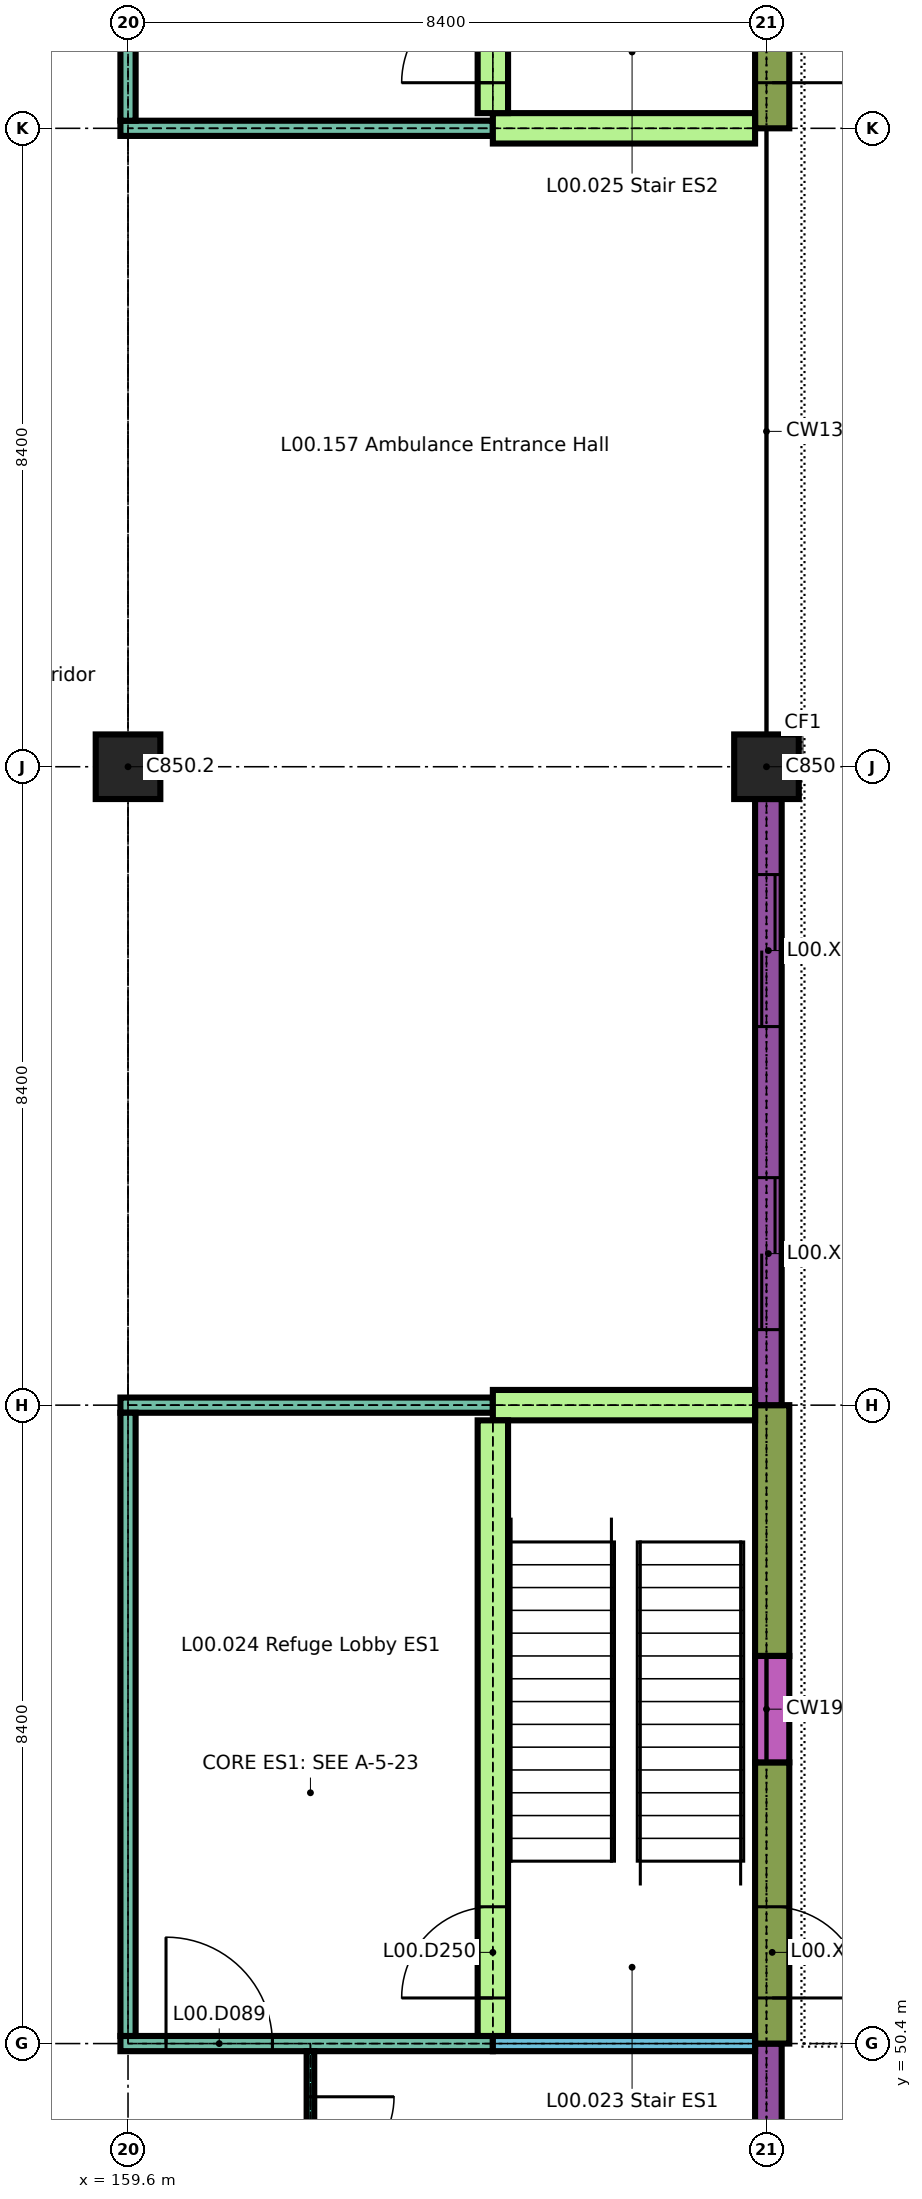
"""IFC4 building model, lengths in metres.
Left out: names, types, materials, properties, quantities, classifications, styles, units other than length and angle.
Written with IfcOpenShell. Run it as: python <this file> out.ifc"""

import sys

from ifc_helpers import new_model, si_unit, direction, frame, frame_2d, origin, origin_2d, place, context, subcontext, project, spatial, rectangle, extrude, element, fill, save


model = new_model("IFC4")
c1 = context("Model", 3, precision=1e-05, world=origin(), true_north=direction((0.0, 1.0)))
c2 = subcontext(c1, "Body", "Model", "MODEL_VIEW")
j1 = project(units=[si_unit("LENGTHUNIT", "METRE"), si_unit("PLANEANGLEUNIT", "RADIAN")], contexts=[c1])
p1 = place(None, origin())
s1 = spatial("IfcSite", under=j1, at=p1, CompositionType="ELEMENT")
p2 = place(p1, origin())
s2 = spatial("IfcBuilding", under=s1, at=p2, CompositionType="ELEMENT")
p3 = place(p2, origin())
s3 = spatial("IfcBuildingStorey", under=s2, at=p3, CompositionType="ELEMENT", Elevation=0.0)
for number, where, z_axis, x_axis in (
    (1, (159.6, 67.2, 0.0), (0.0, 0.0, 1.0), (1.0, 0.0, 0.0)),
    (2, (168.0, 67.2, 0.0), (0.0, 0.0, 1.0), (1.0, 0.0, 0.0)),
):
    element("IfcColumn", number, at=place(p3, frame(where, z_axis=z_axis, x_axis=x_axis)), inside=s3, PredefinedType="COLUMN", context=c2, shape_type="SweptSolid", body=[
        extrude(rectangle(XDim=0.85, YDim=0.85, at=origin_2d()), origin(), (0.0, 0.0, 1.0), 4.14),
    ])
p4 = place(p3, frame((168.025, 46.2, 0.0), z_axis=(0.0, 0.0, 1.0), x_axis=(0.0, 1.0, 0.0)))
e3 = element("IfcWall", 3, at=p4, inside=s3, PredefinedType="SOLIDWALL", context=c2, shape_type="SweptSolid", body=[
    extrude(rectangle(XDim=4.2, YDim=0.35, at=frame_2d((2.1, 0.0))), origin(), (0.0, 0.0, 1.0), 3.84),
])
p5 = place(p4, frame((1.65, 0.0, 1.5)))
e4 = element("IfcOpeningElement", 4, at=p5, cuts=e3, PredefinedType="OPENING", context=c2, shape_type="SweptSolid", body=[
    extrude(rectangle(XDim=0.9, YDim=0.6, at=frame_2d((0.45, 0.3))), frame((0.0, 0.185, 0.0), z_axis=(0.0, -1.0, 0.0), x_axis=(1.0, 0.0, 0.0)), (0.0, 0.0, 1.0), 0.37),
])
p6 = place(p3, frame((168.075, 50.4, 0.0), z_axis=(0.0, 0.0, 1.0), x_axis=(0.0, 1.0, 0.0)))
e5 = element("IfcWall", 5, at=p6, inside=s3, PredefinedType="SOLIDWALL", context=c2, shape_type="SweptSolid", body=[
    extrude(rectangle(XDim=3.7, YDim=0.45, at=frame_2d((1.85, 0.0))), origin(), (0.0, 0.0, 1.0), 4.14),
])
p7 = place(p6, frame((0.6, 0.0, 0.0)))
e6 = element("IfcOpeningElement", 6, at=p7, cuts=e5, PredefinedType="OPENING", context=c2, shape_type="SweptSolid", body=[
    extrude(rectangle(XDim=1.2, YDim=2.1, at=frame_2d((0.6, 1.05))), frame((0.0, 0.235, 0.0), z_axis=(0.0, -1.0, 0.0), x_axis=(1.0, 0.0, 0.0)), (0.0, 0.0, 1.0), 0.47),
])
p8 = place(p3, frame((168.075, 55.5, 0.0), z_axis=(0.0, 0.0, 1.0), x_axis=(0.0, 1.0, 0.0)))
e7 = element("IfcWall", 7, at=p8, inside=s3, PredefinedType="SOLIDWALL", context=c2, shape_type="SweptSolid", body=[
    extrude(rectangle(XDim=3.3, YDim=0.45, at=frame_2d((1.65, 0.0))), origin(), (0.0, 0.0, 1.0), 4.14),
])
p9 = place(p3, frame((168.075, 54.1, 0.0), z_axis=(0.0, 0.0, 1.0), x_axis=(0.0, 1.0, 0.0)))
e8 = element("IfcWall", 8, at=p9, inside=s3, PredefinedType="SOLIDWALL", context=c2, shape_type="SweptSolid", body=[
    extrude(rectangle(XDim=1.4, YDim=0.45, at=frame_2d((0.7, 0.0))), origin(), (0.0, 0.0, 1.0), 0.6),
])
p10 = place(p3, frame((168.025, 58.8, 0.0), z_axis=(0.0, 0.0, 1.0), x_axis=(0.0, 1.0, 0.0)))
e9 = element("IfcWall", 9, at=p10, inside=s3, PredefinedType="SOLIDWALL", context=c2, shape_type="SweptSolid", body=[
    extrude(rectangle(XDim=7.975, YDim=0.35, at=frame_2d((3.987, 0.0))), origin(), (0.0, 0.0, 1.0), 3.84),
])
p11 = place(p10, frame((0.994, 0.0, 0.0)))
e10 = element("IfcOpeningElement", 10, at=p11, cuts=e9, PredefinedType="OPENING", context=c2, shape_type="SweptSolid", body=[
    extrude(rectangle(XDim=2.0, YDim=3.0, at=frame_2d((1.0, 1.5))), frame((0.0, 0.185, 0.0), z_axis=(0.0, -1.0, 0.0), x_axis=(1.0, 0.0, 0.0)), (0.0, 0.0, 1.0), 0.37),
])
p12 = place(p10, frame((4.981, 0.0, 0.0)))
e11 = element("IfcOpeningElement", 11, at=p12, cuts=e9, PredefinedType="OPENING", context=c2, shape_type="SweptSolid", body=[
    extrude(rectangle(XDim=2.0, YDim=3.0, at=frame_2d((1.0, 1.5))), frame((0.0, 0.185, 0.0), z_axis=(0.0, -1.0, 0.0), x_axis=(1.0, 0.0, 0.0)), (0.0, 0.0, 1.0), 0.37),
])
p13 = place(p3, frame((168.075, 75.6, 0.0), z_axis=(0.0, 0.0, 1.0), x_axis=(0.0, 1.0, 0.0)))
e12 = element("IfcWall", 12, at=p13, inside=s3, PredefinedType="SOLIDWALL", context=c2, shape_type="SweptSolid", body=[
    extrude(rectangle(XDim=3.7, YDim=0.45, at=frame_2d((1.85, 0.0))), origin(), (0.0, 0.0, 1.0), 4.14),
])
p14 = place(p13, frame((0.6, 0.0, 0.0)))
e13 = element("IfcOpeningElement", 13, at=p14, cuts=e12, PredefinedType="OPENING", context=c2, shape_type="SweptSolid", body=[
    extrude(rectangle(XDim=1.2, YDim=2.1, at=frame_2d((0.6, 1.05))), frame((0.0, 0.235, 0.0), z_axis=(0.0, -1.0, 0.0), x_axis=(1.0, 0.0, 0.0)), (0.0, 0.0, 1.0), 0.47),
])
p15 = place(p3, frame((159.5, 50.4, 0.0), z_axis=(0.0, 0.0, 1.0), x_axis=(1.0, 0.0, 0.0)))
e14 = element("IfcWall", 14, at=p15, inside=s3, PredefinedType="PARTITIONING", context=c2, shape_type="SweptSolid", body=[
    extrude(rectangle(XDim=4.9, YDim=0.2, at=frame_2d((2.45, 0.0))), origin(), (0.0, 0.0, 1.0), 4.14),
])
p16 = place(p15, frame((0.6, 0.0, 0.0)))
e15 = element("IfcOpeningElement", 15, at=p16, cuts=e14, PredefinedType="OPENING", context=c2, shape_type="SweptSolid", body=[
    extrude(rectangle(XDim=1.4, YDim=2.1, at=frame_2d((0.7, 1.05))), frame((0.0, 0.11, 0.0), z_axis=(0.0, -1.0, 0.0), x_axis=(1.0, 0.0, 0.0)), (0.0, 0.0, 1.0), 0.22),
])
p17 = place(p3, frame((164.4, 50.4, 0.0), z_axis=(0.0, 0.0, 1.0), x_axis=(1.0, 0.0, 0.0)))
e16 = element("IfcWall", 16, at=p17, inside=s3, PredefinedType="PARTITIONING", context=c2, shape_type="SweptSolid", body=[
    extrude(rectangle(XDim=3.45, YDim=0.2, at=frame_2d((1.725, 0.0))), origin(), (0.0, 0.0, 1.0), 4.14),
])
p18 = place(p3, frame((159.5, 58.8, 0.0), z_axis=(0.0, 0.0, 1.0), x_axis=(1.0, 0.0, 0.0)))
e17 = element("IfcWall", 17, at=p18, inside=s3, PredefinedType="PARTITIONING", context=c2, shape_type="SweptSolid", body=[
    extrude(rectangle(XDim=4.9, YDim=0.2, at=frame_2d((2.45, 0.0))), origin(), (0.0, 0.0, 1.0), 4.14),
])
p19 = place(p3, frame((164.4, 58.8, 0.0), z_axis=(0.0, 0.0, 1.0), x_axis=(1.0, 0.0, 0.0)))
e18 = element("IfcWall", 18, at=p19, inside=s3, PredefinedType="SHEAR", context=c2, shape_type="SweptSolid", body=[
    extrude(rectangle(XDim=3.45, YDim=0.4, at=frame_2d((1.725, 0.0))), origin(), (0.0, 0.0, 1.0), 4.14),
])
p20 = place(p3, frame((159.5, 75.6, 0.0), z_axis=(0.0, 0.0, 1.0), x_axis=(1.0, 0.0, 0.0)))
e19 = element("IfcWall", 19, at=p20, inside=s3, PredefinedType="PARTITIONING", context=c2, shape_type="SweptSolid", body=[
    extrude(rectangle(XDim=4.9, YDim=0.2, at=frame_2d((2.45, 0.0))), origin(), (0.0, 0.0, 1.0), 4.14),
])
p21 = place(p3, frame((164.4, 75.6, 0.0), z_axis=(0.0, 0.0, 1.0), x_axis=(1.0, 0.0, 0.0)))
e20 = element("IfcWall", 20, at=p21, inside=s3, PredefinedType="SHEAR", context=c2, shape_type="SweptSolid", body=[
    extrude(rectangle(XDim=3.45, YDim=0.4, at=frame_2d((1.725, 0.0))), origin(), (0.0, 0.0, 1.0), 4.14),
])
p22 = place(p3, frame((159.6, 50.5, 0.0), z_axis=(0.0, 0.0, 1.0), x_axis=(0.0, 1.0, 0.0)))
e21 = element("IfcWall", 21, at=p22, inside=s3, PredefinedType="PARTITIONING", context=c2, shape_type="SweptSolid", body=[
    extrude(rectangle(XDim=8.2, YDim=0.2, at=frame_2d((4.1, 0.0))), origin(), (0.0, 0.0, 1.0), 4.14),
])
p23 = place(p3, frame((159.6, 75.7, 0.0), z_axis=(0.0, 0.0, 1.0), x_axis=(0.0, 1.0, 0.0)))
e22 = element("IfcWall", 22, at=p23, inside=s3, PredefinedType="PARTITIONING", context=c2, shape_type="SweptSolid", body=[
    extrude(rectangle(XDim=8.3, YDim=0.2, at=frame_2d((4.15, 0.0))), origin(), (0.0, 0.0, 1.0), 4.14),
])
p24 = place(p23, frame((3.45, 0.0, 0.0)))
e23 = element("IfcOpeningElement", 23, at=p24, cuts=e22, PredefinedType="OPENING", context=c2, shape_type="SweptSolid", body=[
    extrude(rectangle(XDim=1.4, YDim=2.1, at=frame_2d((0.7, 1.05))), frame((0.0, 0.11, 0.0), z_axis=(0.0, -1.0, 0.0), x_axis=(1.0, 0.0, 0.0)), (0.0, 0.0, 1.0), 0.22),
])
p25 = place(p3, frame((162.0, 42.075, 0.0), z_axis=(0.0, 0.0, 1.0), x_axis=(0.0, 1.0, 0.0)))
e24 = element("IfcWall", 24, at=p25, inside=s3, PredefinedType="PARTITIONING", context=c2, shape_type="SweptSolid", body=[
    extrude(rectangle(XDim=8.225, YDim=0.1, at=frame_2d((4.113, 0.0))), origin(), (0.0, 0.0, 1.0), 4.14),
])
p26 = place(p25, frame((0.712, 0.0, 0.0)))
e25 = element("IfcOpeningElement", 25, at=p26, cuts=e24, PredefinedType="OPENING", context=c2, shape_type="SweptSolid", body=[
    extrude(rectangle(XDim=0.9, YDim=2.1, at=frame_2d((0.45, 1.05))), frame((0.0, 0.06, 0.0), z_axis=(0.0, -1.0, 0.0), x_axis=(1.0, 0.0, 0.0)), (0.0, 0.0, 1.0), 0.12),
])
p27 = place(p25, frame((6.525, 0.0, 0.0)))
e26 = element("IfcOpeningElement", 26, at=p27, cuts=e24, PredefinedType="OPENING", context=c2, shape_type="SweptSolid", body=[
    extrude(rectangle(XDim=1.1, YDim=2.1, at=frame_2d((0.55, 1.05))), frame((0.0, 0.06, 0.0), z_axis=(0.0, -1.0, 0.0), x_axis=(1.0, 0.0, 0.0)), (0.0, 0.0, 1.0), 0.12),
])
p28 = place(p3, frame((164.4, 50.5, 0.0), z_axis=(0.0, 0.0, 1.0), x_axis=(0.0, 1.0, 0.0)))
e27 = element("IfcWall", 27, at=p28, inside=s3, PredefinedType="SHEAR", context=c2, shape_type="SweptSolid", body=[
    extrude(rectangle(XDim=8.1, YDim=0.4, at=frame_2d((4.05, 0.0))), origin(), (0.0, 0.0, 1.0), 4.14),
])
p29 = place(p28, frame((0.5, 0.0, 0.0)))
e28 = element("IfcOpeningElement", 28, at=p29, cuts=e27, PredefinedType="OPENING", context=c2, shape_type="SweptSolid", body=[
    extrude(rectangle(XDim=1.2, YDim=2.1, at=frame_2d((0.6, 1.05))), frame((0.0, 0.21, 0.0), z_axis=(0.0, -1.0, 0.0), x_axis=(1.0, 0.0, 0.0)), (0.0, 0.0, 1.0), 0.42),
])
p30 = place(p3, frame((164.4, 75.8, 0.0), z_axis=(0.0, 0.0, 1.0), x_axis=(0.0, 1.0, 0.0)))
e29 = element("IfcWall", 29, at=p30, inside=s3, PredefinedType="SHEAR", context=c2, shape_type="SweptSolid", body=[
    extrude(rectangle(XDim=8.0, YDim=0.4, at=frame_2d((4.0, 0.0))), origin(), (0.0, 0.0, 1.0), 4.14),
])
p31 = place(p30, frame((0.4, 0.0, 0.0)))
e30 = element("IfcOpeningElement", 30, at=p31, cuts=e29, PredefinedType="OPENING", context=c2, shape_type="SweptSolid", body=[
    extrude(rectangle(XDim=1.2, YDim=2.1, at=frame_2d((0.6, 1.05))), frame((0.0, 0.21, 0.0), z_axis=(0.0, -1.0, 0.0), x_axis=(1.0, 0.0, 0.0)), (0.0, 0.0, 1.0), 0.42),
])
p32 = place(p7, frame((1.2, 0.0, 0.0), x_axis=(-1.0, 0.0, 0.0)))
e31 = element("IfcDoor", 31, at=p32, inside=s3, OperationType="SINGLE_SWING_LEFT", PredefinedType="DOOR", context=c2, shape_type="SweptSolid", body=[
    extrude(rectangle(XDim=1.2, YDim=2.1, at=frame_2d((0.6, 1.05))), frame((0.0, 0.025, 0.0), z_axis=(0.0, -1.0, 0.0), x_axis=(1.0, 0.0, 0.0)), (0.0, 0.0, 1.0), 0.05),
])
fill(e6, e31)
p33 = place(p11, frame((2.0, 0.0, 0.0), x_axis=(-1.0, 0.0, 0.0)))
e32 = element("IfcDoor", 32, at=p33, inside=s3, OperationType="DOUBLE_DOOR_SLIDING", PredefinedType="DOOR", context=c2, shape_type="SweptSolid", body=[
    extrude(rectangle(XDim=2.0, YDim=3.0, at=frame_2d((1.0, 1.5))), frame((0.0, 0.06, 0.0), z_axis=(0.0, -1.0, 0.0), x_axis=(1.0, 0.0, 0.0)), (0.0, 0.0, 1.0), 0.12),
])
fill(e10, e32)
p34 = place(p12, frame((2.0, 0.0, 0.0), x_axis=(-1.0, 0.0, 0.0)))
e33 = element("IfcDoor", 33, at=p34, inside=s3, OperationType="DOUBLE_DOOR_SLIDING", PredefinedType="DOOR", context=c2, shape_type="SweptSolid", body=[
    extrude(rectangle(XDim=2.0, YDim=3.0, at=frame_2d((1.0, 1.5))), frame((0.0, 0.06, 0.0), z_axis=(0.0, -1.0, 0.0), x_axis=(1.0, 0.0, 0.0)), (0.0, 0.0, 1.0), 0.12),
])
fill(e11, e33)
p35 = place(p14, frame((1.2, 0.0, 0.0), x_axis=(-1.0, 0.0, 0.0)))
e34 = element("IfcDoor", 34, at=p35, inside=s3, OperationType="SINGLE_SWING_LEFT", PredefinedType="DOOR", context=c2, shape_type="SweptSolid", body=[
    extrude(rectangle(XDim=1.2, YDim=2.1, at=frame_2d((0.6, 1.05))), frame((0.0, 0.025, 0.0), z_axis=(0.0, -1.0, 0.0), x_axis=(1.0, 0.0, 0.0)), (0.0, 0.0, 1.0), 0.05),
])
fill(e13, e34)
p36 = place(p16, origin())
e35 = element("IfcDoor", 35, at=p36, inside=s3, OperationType="SINGLE_SWING_RIGHT", PredefinedType="DOOR", context=c2, shape_type="SweptSolid", body=[
    extrude(rectangle(XDim=1.4, YDim=2.1, at=frame_2d((0.7, 1.05))), frame((0.0, 0.03, 0.0), z_axis=(0.0, -1.0, 0.0), x_axis=(1.0, 0.0, 0.0)), (0.0, 0.0, 1.0), 0.06),
])
fill(e15, e35)
p37 = place(p27, origin())
e36 = element("IfcDoor", 36, at=p37, inside=s3, OperationType="SINGLE_SWING_RIGHT", PredefinedType="DOOR", context=c2, shape_type="SweptSolid", body=[
    extrude(rectangle(XDim=1.1, YDim=2.1, at=frame_2d((0.55, 1.05))), frame((0.0, 0.025, 0.0), z_axis=(0.0, -1.0, 0.0), x_axis=(1.0, 0.0, 0.0)), (0.0, 0.0, 1.0), 0.05),
])
fill(e26, e36)
p38 = place(p29, origin())
e37 = element("IfcDoor", 37, at=p38, inside=s3, OperationType="SINGLE_SWING_RIGHT", PredefinedType="DOOR", context=c2, shape_type="SweptSolid", body=[
    extrude(rectangle(XDim=1.2, YDim=2.1, at=frame_2d((0.6, 1.05))), frame((0.0, 0.025, 0.0), z_axis=(0.0, -1.0, 0.0), x_axis=(1.0, 0.0, 0.0)), (0.0, 0.0, 1.0), 0.05),
])
fill(e28, e37)
p39 = place(p31, origin())
e38 = element("IfcDoor", 38, at=p39, inside=s3, OperationType="SINGLE_SWING_RIGHT", PredefinedType="DOOR", context=c2, shape_type="SweptSolid", body=[
    extrude(rectangle(XDim=1.2, YDim=2.1, at=frame_2d((0.6, 1.05))), frame((0.0, 0.025, 0.0), z_axis=(0.0, -1.0, 0.0), x_axis=(1.0, 0.0, 0.0)), (0.0, 0.0, 1.0), 0.05),
])
fill(e30, e38)
save(model, sys.argv[1])
